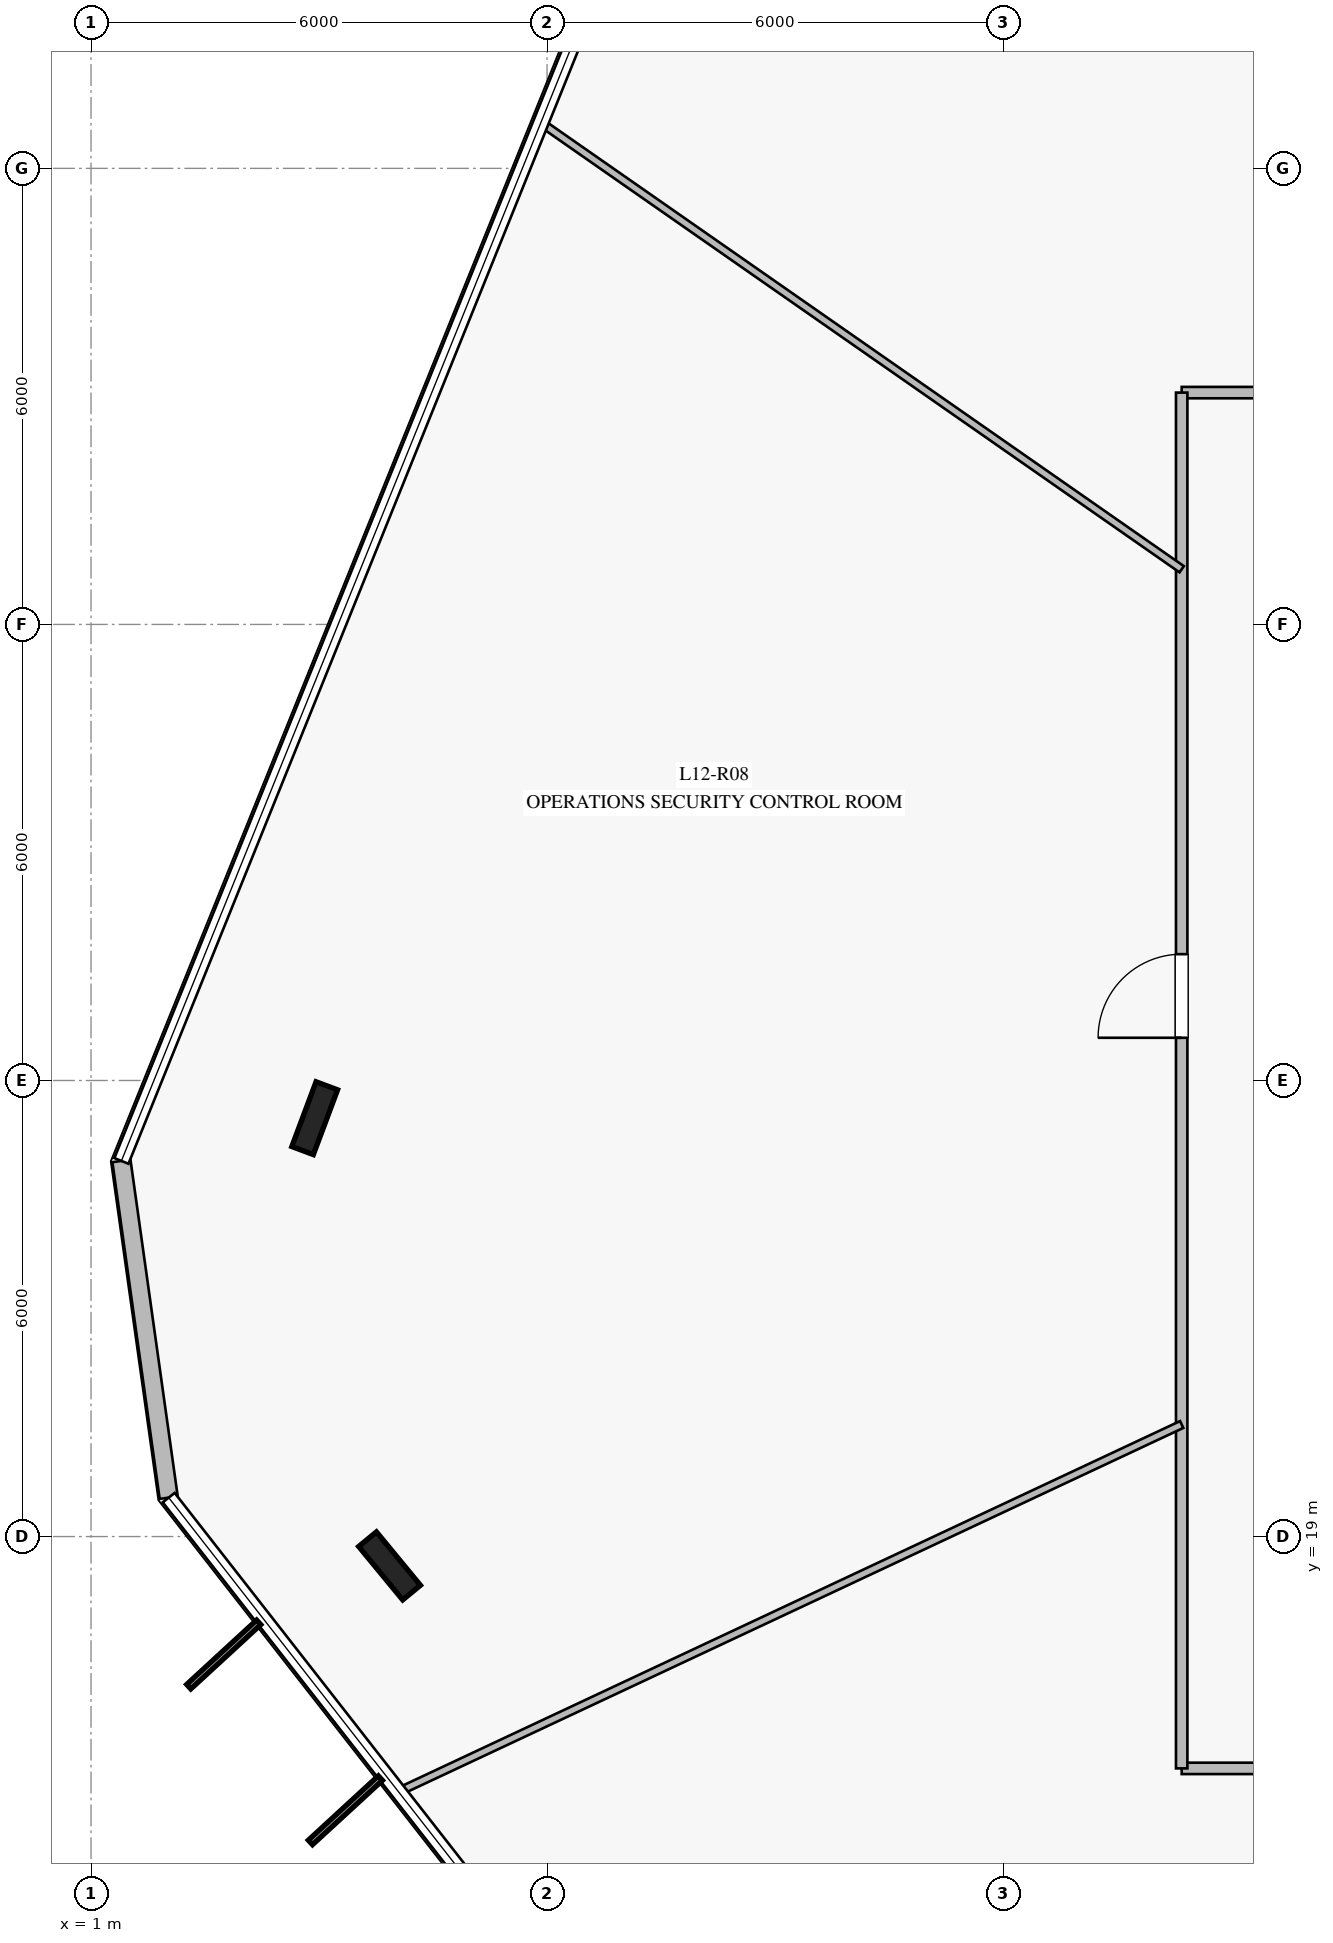
"""IFC4 building model, lengths in metres.
Left out: names, types, materials, properties, quantities, classifications, styles, units other than length and angle.
Written with IfcOpenShell. Run it as: python <this file> out.ifc"""

import sys

from ifc_helpers import new_model, si_unit, direction, frame, frame_2d, origin, origin_2d, place, context, subcontext, project, spatial, rectangle, i_section, extrude, element, fill, save


model = new_model("IFC4")
c1 = context("Model", 3, precision=1e-05, world=origin(), true_north=direction((0.0, 1.0)))
c2 = subcontext(c1, "Body", "Model", "MODEL_VIEW")
j1 = project(units=[si_unit("LENGTHUNIT", "METRE"), si_unit("PLANEANGLEUNIT", "RADIAN")], contexts=[c1])
p1 = place(None, origin())
s1 = spatial("IfcSite", under=j1, at=p1, CompositionType="ELEMENT")
p2 = place(p1, origin())
s2 = spatial("IfcBuilding", under=s1, at=p2, CompositionType="ELEMENT")
p3 = place(p2, frame((0.0, 0.0, 52.0)))
s3 = spatial("IfcBuildingStorey", under=s2, at=p3, CompositionType="ELEMENT", Elevation=52.0)
for number, where, z_axis, x_axis in (
    (1, (3.943, 24.504, 0.0), (0.0, 0.0, 1.0), (0.35, 0.937, 0.0)),
    (2, (4.928, 18.614, 0.0), (0.0, 0.0, 1.0), (-0.636, 0.772, 0.0)),
):
    element("IfcColumn", number, at=place(p3, frame(where, z_axis=z_axis, x_axis=x_axis)), inside=s3, PredefinedType="COLUMN", context=c2, shape_type="SweptSolid", body=[
        extrude(i_section(OverallWidth=0.302, OverallDepth=0.91, WebThickness=0.021, FlangeThickness=0.04, at=origin_2d()), origin(), (0.0, 0.0, 1.0), 4.0),
    ])
p4 = place(p3, frame((1.4, 23.942, 0.0), z_axis=(0.0, 0.0, 1.0), x_axis=(0.139059990467, -0.990283958797, 0.0)))
e3 = element("IfcWall", 3, at=p4, inside=s3, PredefinedType="STANDARD", context=c2, shape_type="SweptSolid", body=[
    extrude(rectangle(XDim=4.473, YDim=0.24, at=frame_2d((2.237, 0.0))), origin(), (0.0, 0.0, 1.0), 3.76),
])
p5 = place(p3, frame((15.35, 34.05, 0.0), z_axis=(0.0, 0.0, 1.0), x_axis=(1.0, 0.0, 0.0)))
e4 = element("IfcWall", 4, at=p5, inside=s3, PredefinedType="PARTITIONING", context=c2, shape_type="SweptSolid", body=[
    extrude(rectangle(XDim=19.3, YDim=0.15, at=frame_2d((9.65, 0.0))), origin(), (0.0, 0.0, 1.0), 3.21),
])
p6 = place(p5, frame((13.465, 0.0, 0.0)))
e5 = element("IfcOpeningElement", 5, at=p6, cuts=e4, PredefinedType="OPENING", context=c2, shape_type="SweptSolid", body=[
    extrude(rectangle(XDim=1.1, YDim=2.2, at=frame_2d((0.55, 1.1))), frame((0.0, 0.085, 0.0), z_axis=(0.0, -1.0, 0.0), x_axis=(1.0, 0.0, 0.0)), (0.0, 0.0, 1.0), 0.17),
])
p7 = place(p5, frame((4.424, 0.0, 0.0)))
e6 = element("IfcOpeningElement", 6, at=p7, cuts=e4, PredefinedType="OPENING", context=c2, shape_type="SweptSolid", body=[
    extrude(rectangle(XDim=1.1, YDim=2.2, at=frame_2d((0.55, 1.1))), frame((0.0, 0.085, 0.0), z_axis=(0.0, -1.0, 0.0), x_axis=(1.0, 0.0, 0.0)), (0.0, 0.0, 1.0), 0.17),
])
p8 = place(p3, frame((34.65, 15.95, 0.0), z_axis=(0.0, 0.0, 1.0), x_axis=(-1.0, 0.0, 0.0)))
e7 = element("IfcWall", 7, at=p8, inside=s3, PredefinedType="PARTITIONING", context=c2, shape_type="SweptSolid", body=[
    extrude(rectangle(XDim=19.3, YDim=0.15, at=frame_2d((9.65, 0.0))), origin(), (0.0, 0.0, 1.0), 3.21),
])
p9 = place(p8, frame((15.01, 0.0, 0.0)))
e8 = element("IfcOpeningElement", 8, at=p9, cuts=e7, PredefinedType="OPENING", context=c2, shape_type="SweptSolid", body=[
    extrude(rectangle(XDim=1.1, YDim=2.2, at=frame_2d((0.55, 1.1))), frame((0.0, 0.085, 0.0), z_axis=(0.0, -1.0, 0.0), x_axis=(1.0, 0.0, 0.0)), (0.0, 0.0, 1.0), 0.17),
])
p10 = place(p8, frame((6.126, 0.0, 0.0)))
e9 = element("IfcOpeningElement", 9, at=p10, cuts=e7, PredefinedType="OPENING", context=c2, shape_type="SweptSolid", body=[
    extrude(rectangle(XDim=1.1, YDim=2.2, at=frame_2d((0.55, 1.1))), frame((0.0, 0.085, 0.0), z_axis=(0.0, -1.0, 0.0), x_axis=(1.0, 0.0, 0.0)), (0.0, 0.0, 1.0), 0.17),
])
p11 = place(p3, frame((15.35, 15.95, 0.0), z_axis=(0.0, 0.0, 1.0), x_axis=(0.0, 1.0, 0.0)))
e10 = element("IfcWall", 10, at=p11, inside=s3, PredefinedType="PARTITIONING", context=c2, shape_type="SweptSolid", body=[
    extrude(rectangle(XDim=18.1, YDim=0.15, at=frame_2d((9.05, 0.0))), origin(), (0.0, 0.0, 1.0), 3.21),
])
p12 = place(p11, frame((9.612, 0.0, 0.0)))
e11 = element("IfcOpeningElement", 11, at=p12, cuts=e10, PredefinedType="OPENING", context=c2, shape_type="SweptSolid", body=[
    extrude(rectangle(XDim=1.1, YDim=2.2, at=frame_2d((0.55, 1.1))), frame((0.0, 0.085, 0.0), z_axis=(0.0, -1.0, 0.0), x_axis=(1.0, 0.0, 0.0)), (0.0, 0.0, 1.0), 0.17),
])
p13 = place(p3, frame((15.35, 31.726, 0.0), z_axis=(0.0, 0.0, 1.0), x_axis=(-0.820386326114, 0.57180965008, 0.0)))
e12 = element("IfcWall", 12, at=p13, inside=s3, PredefinedType="MOVABLE", context=c2, shape_type="SweptSolid", body=[
    extrude(rectangle(XDim=10.259, YDim=0.1, at=frame_2d((5.129, 0.0))), origin(), (0.0, 0.0, 1.0), 3.05),
])
p14 = place(p3, frame((15.35, 20.474, 0.0), z_axis=(0.0, 0.0, 1.0), x_axis=(-0.905402160526, -0.42455497608, 0.0)))
e13 = element("IfcWall", 13, at=p14, inside=s3, PredefinedType="MOVABLE", context=c2, shape_type="SweptSolid", body=[
    extrude(rectangle(XDim=11.363, YDim=0.1, at=frame_2d((5.682, 0.0))), origin(), (0.0, 0.0, 1.0), 3.06),
])
p15 = place(p12, origin())
e14 = element("IfcDoor", 14, at=p15, inside=s3, OperationType="SINGLE_SWING_LEFT", PredefinedType="DOOR", context=c2, shape_type="SweptSolid", body=[
    extrude(rectangle(XDim=1.1, YDim=2.2, at=frame_2d((0.55, 1.1))), frame((0.0, 0.025, 0.0), z_axis=(0.0, -1.0, 0.0), x_axis=(1.0, 0.0, 0.0)), (0.0, 0.0, 1.0), 0.05),
])
fill(e11, e14)
save(model, sys.argv[1])
